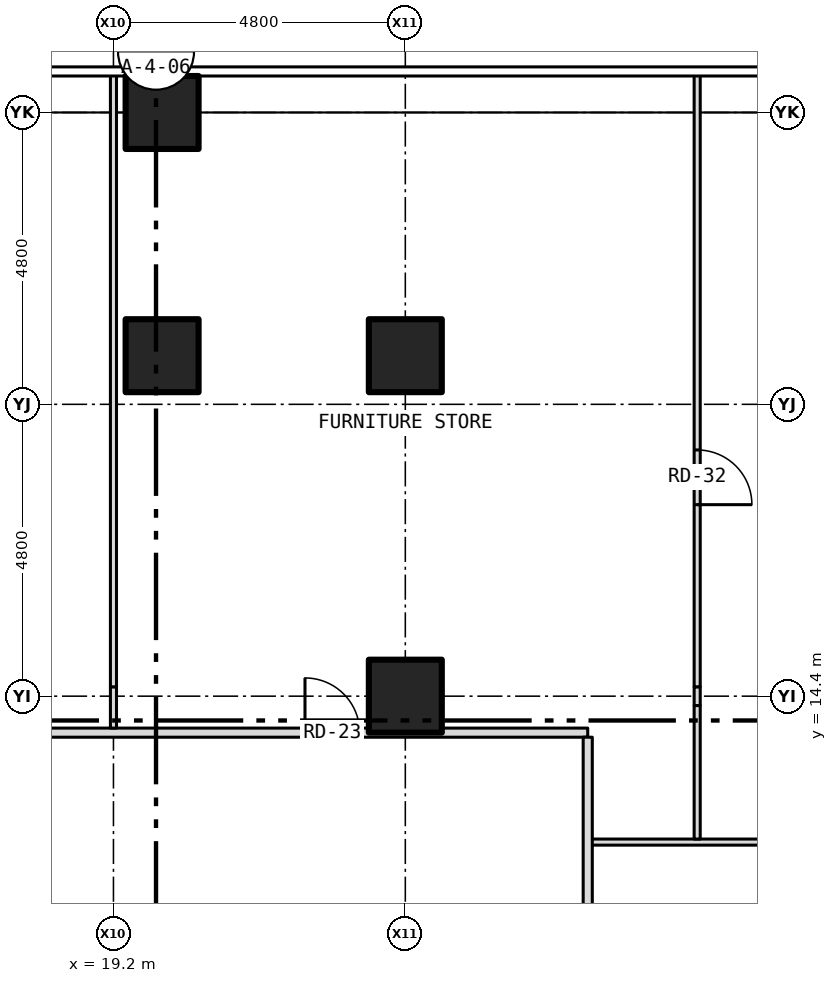
"""IFC4 building model, lengths in metres.
Left out: names, types, materials, properties, quantities, classifications, styles, units other than length and angle.
Written with IfcOpenShell. Run it as: python <this file> out.ifc"""

import sys

from ifc_helpers import new_model, si_unit, direction, frame, frame_2d, origin, origin_2d, place, context, subcontext, project, spatial, rectangle, hollow_rectangle, extrude, element, fill, save


model = new_model("IFC4")
c1 = context("Model", 3, precision=1e-05, world=origin(), true_north=direction((0.0, 1.0)))
c2 = subcontext(c1, "Body", "Model", "MODEL_VIEW")
j1 = project(units=[si_unit("LENGTHUNIT", "METRE"), si_unit("PLANEANGLEUNIT", "RADIAN")], contexts=[c1])
p1 = place(None, origin())
s1 = spatial("IfcSite", under=j1, at=p1, CompositionType="ELEMENT")
p2 = place(p1, origin())
s2 = spatial("IfcBuilding", under=s1, at=p2, CompositionType="ELEMENT")
p3 = place(p2, frame((0.0, 0.0, 15.5)))
s3 = spatial("IfcBuildingStorey", under=s2, at=p3, CompositionType="ELEMENT", Elevation=15.5)
for number, where, z_axis, x_axis in (
    (1, (20.0, 24.0, -0.2), (0.0, 0.0, 1.0), (1.0, 0.0, 0.0)),
    (2, (20.0, 20.0, -0.2), (0.0, 0.0, 1.0), (1.0, 0.0, 0.0)),
    (3, (24.0, 14.4, -0.2), (0.0, 0.0, 1.0), (1.0, 0.0, 0.0)),
    (4, (24.0, 20.0, -0.2), (0.0, 0.0, 1.0), (1.0, 0.0, 0.0)),
):
    element("IfcColumn", number, at=place(p3, frame(where, z_axis=z_axis, x_axis=x_axis)), inside=s3, PredefinedType="COLUMN", context=c2, shape_type="SweptSolid", body=[
        extrude(hollow_rectangle(XDim=1.2, YDim=1.2, WallThickness=0.07, at=origin_2d()), origin(), (0.0, 0.0, 1.0), 4.5),
    ])
p4 = place(p3, frame((27.0, 12.0, 0.0), z_axis=(0.0, 0.0, 1.0), x_axis=(1.0, 0.0, 0.0)))
e5 = element("IfcWall", 5, at=p4, inside=s3, PredefinedType="PARTITIONING", context=c2, shape_type="SweptSolid", body=[
    extrude(rectangle(XDim=11.28, YDim=0.1, at=frame_2d((5.64, 0.0))), origin(), (0.0, 0.0, 1.0), 4.3),
])
p5 = place(p3, frame((-27.0, 13.8, 0.0), z_axis=(0.0, 0.0, 1.0), x_axis=(1.0, 0.0, 0.0)))
e6 = element("IfcWall", 6, at=p5, inside=s3, PredefinedType="PARTITIONING", context=c2, shape_type="SweptSolid", body=[
    extrude(rectangle(XDim=54.0, YDim=0.15, at=frame_2d((27.0, 0.0))), origin(), (0.0, 0.0, 1.0), 4.3),
])
p6 = place(p5, frame((29.001, 0.0, 0.0)))
e7 = element("IfcOpeningElement", 7, at=p6, cuts=e6, PredefinedType="OPENING", context=c2, shape_type="SweptSolid", body=[
    extrude(rectangle(XDim=0.9, YDim=2.1, at=frame_2d((0.45, 1.05))), frame((0.0, 0.087, 0.0), z_axis=(0.0, -1.0, 0.0), x_axis=(1.0, 0.0, 0.0)), (0.0, 0.0, 1.0), 0.174),
])
p7 = place(p5, frame((33.801, 0.0, 0.0)))
e8 = element("IfcOpeningElement", 8, at=p7, cuts=e6, PredefinedType="OPENING", context=c2, shape_type="SweptSolid", body=[
    extrude(rectangle(XDim=0.9, YDim=2.1, at=frame_2d((0.45, 1.05))), frame((0.0, 0.087, 0.0), z_axis=(0.0, -1.0, 0.0), x_axis=(1.0, 0.0, 0.0)), (0.0, 0.0, 1.0), 0.174),
])
p8 = place(p5, frame((38.601, 0.0, 0.0)))
e9 = element("IfcOpeningElement", 9, at=p8, cuts=e6, PredefinedType="OPENING", context=c2, shape_type="SweptSolid", body=[
    extrude(rectangle(XDim=0.9, YDim=2.1, at=frame_2d((0.45, 1.05))), frame((0.0, 0.087, 0.0), z_axis=(0.0, -1.0, 0.0), x_axis=(1.0, 0.0, 0.0)), (0.0, 0.0, 1.0), 0.174),
])
p9 = place(p5, frame((43.401, 0.0, 0.0)))
e10 = element("IfcOpeningElement", 10, at=p9, cuts=e6, PredefinedType="OPENING", context=c2, shape_type="SweptSolid", body=[
    extrude(rectangle(XDim=0.9, YDim=2.1, at=frame_2d((0.45, 1.05))), frame((0.0, 0.087, 0.0), z_axis=(0.0, -1.0, 0.0), x_axis=(1.0, 0.0, 0.0)), (0.0, 0.0, 1.0), 0.174),
])
p10 = place(p5, frame((9.801, 0.0, 0.0)))
e11 = element("IfcOpeningElement", 11, at=p10, cuts=e6, PredefinedType="OPENING", context=c2, shape_type="SweptSolid", body=[
    extrude(rectangle(XDim=0.9, YDim=2.1, at=frame_2d((0.45, 1.05))), frame((0.0, 0.087, 0.0), z_axis=(0.0, -1.0, 0.0), x_axis=(1.0, 0.0, 0.0)), (0.0, 0.0, 1.0), 0.174),
])
p11 = place(p5, frame((14.601, 0.0, 0.0)))
e12 = element("IfcOpeningElement", 12, at=p11, cuts=e6, PredefinedType="OPENING", context=c2, shape_type="SweptSolid", body=[
    extrude(rectangle(XDim=0.9, YDim=2.1, at=frame_2d((0.45, 1.05))), frame((0.0, 0.087, 0.0), z_axis=(0.0, -1.0, 0.0), x_axis=(1.0, 0.0, 0.0)), (0.0, 0.0, 1.0), 0.174),
])
p12 = place(p5, frame((20.095, 0.0, 0.0)))
e13 = element("IfcOpeningElement", 13, at=p12, cuts=e6, PredefinedType="OPENING", context=c2, shape_type="SweptSolid", body=[
    extrude(rectangle(XDim=0.9, YDim=2.1, at=frame_2d((0.45, 1.05))), frame((0.0, 0.087, 0.0), z_axis=(0.0, -1.0, 0.0), x_axis=(1.0, 0.0, 0.0)), (0.0, 0.0, 1.0), 0.174),
])
p13 = place(p5, frame((3.75, 0.0, 0.0)))
e14 = element("IfcOpeningElement", 14, at=p13, cuts=e6, PredefinedType="OPENING", context=c2, shape_type="SweptSolid", body=[
    extrude(rectangle(XDim=0.9, YDim=2.1, at=frame_2d((0.45, 1.05))), frame((0.0, 0.087, 0.0), z_axis=(0.0, -1.0, 0.0), x_axis=(1.0, 0.0, 0.0)), (0.0, 0.0, 1.0), 0.174),
])
p14 = place(p5, frame((49.35, 0.0, 0.0)))
e15 = element("IfcOpeningElement", 15, at=p14, cuts=e6, PredefinedType="OPENING", context=c2, shape_type="SweptSolid", body=[
    extrude(rectangle(XDim=0.9, YDim=2.1, at=frame_2d((0.45, 1.05))), frame((0.0, 0.087, 0.0), z_axis=(0.0, -1.0, 0.0), x_axis=(1.0, 0.0, 0.0)), (0.0, 0.0, 1.0), 0.174),
])
p15 = place(p5, frame((24.303, 0.0, 0.0)))
e16 = element("IfcOpeningElement", 16, at=p15, cuts=e6, PredefinedType="OPENING", context=c2, shape_type="SweptSolid", body=[
    extrude(rectangle(XDim=0.9, YDim=2.1, at=frame_2d((0.45, 1.05))), frame((0.0, 0.087, 0.0), z_axis=(0.0, -1.0, 0.0), x_axis=(1.0, 0.0, 0.0)), (0.0, 0.0, 1.0), 0.174),
])
p16 = place(p3, frame((19.2, 13.875, 0.0), z_axis=(0.0, 0.0, 1.0), x_axis=(0.0, 1.0, 0.0)))
e17 = element("IfcWall", 17, at=p16, inside=s3, PredefinedType="PARTITIONING", context=c2, shape_type="SweptSolid", body=[
    extrude(rectangle(XDim=0.679, YDim=0.1, at=frame_2d((0.339, 0.0))), origin(), (0.0, 0.0, 1.0), 4.3),
])
p17 = place(p3, frame((19.2, 14.554, 0.0), z_axis=(0.0, 0.0, 1.0), x_axis=(0.0, 1.0, 0.0)))
e18 = element("IfcWall", 18, at=p17, inside=s3, PredefinedType="PARTITIONING", context=c2, shape_type="SweptSolid", body=[
    extrude(rectangle(XDim=10.076, YDim=0.1, at=frame_2d((5.038, 0.0))), origin(), (0.0, 0.0, 1.0), 3.683),
])
p18 = place(p3, frame((27.0, -13.725, 0.0), z_axis=(0.0, 0.0, 1.0), x_axis=(0.0, 1.0, 0.0)))
e19 = element("IfcWall", 19, at=p18, inside=s3, PredefinedType="PARTITIONING", context=c2, shape_type="SweptSolid", body=[
    extrude(rectangle(XDim=27.45, YDim=0.15, at=frame_2d((13.725, 0.0))), origin(), (0.0, 0.0, 1.0), 4.3),
])
p19 = place(p18, frame((7.275, 0.0, 0.0)))
e20 = element("IfcOpeningElement", 20, at=p19, cuts=e19, PredefinedType="OPENING", context=c2, shape_type="SweptSolid", body=[
    extrude(rectangle(XDim=0.9, YDim=2.1, at=frame_2d((0.45, 1.05))), frame((0.0, 0.087, 0.0), z_axis=(0.0, -1.0, 0.0), x_axis=(1.0, 0.0, 0.0)), (0.0, 0.0, 1.0), 0.174),
])
p20 = place(p18, frame((19.275, 0.0, 0.0)))
e21 = element("IfcOpeningElement", 21, at=p20, cuts=e19, PredefinedType="OPENING", context=c2, shape_type="SweptSolid", body=[
    extrude(rectangle(XDim=0.9, YDim=2.1, at=frame_2d((0.45, 1.05))), frame((0.0, 0.087, 0.0), z_axis=(0.0, -1.0, 0.0), x_axis=(1.0, 0.0, 0.0)), (0.0, 0.0, 1.0), 0.174),
])
p21 = place(p3, frame((28.8, 12.05, 0.0), z_axis=(0.0, 0.0, 1.0), x_axis=(0.0, 1.0, 0.0)))
e22 = element("IfcWall", 22, at=p21, inside=s3, PredefinedType="PARTITIONING", context=c2, shape_type="SweptSolid", body=[
    extrude(rectangle(XDim=2.196, YDim=0.1, at=frame_2d((1.098, 0.0))), origin(), (0.0, 0.0, 1.0), 3.683),
])
p22 = place(p3, frame((28.8, 14.246, 0.0), z_axis=(0.0, 0.0, 1.0), x_axis=(0.0, 1.0, 0.0)))
e23 = element("IfcWall", 23, at=p22, inside=s3, PredefinedType="PARTITIONING", context=c2, shape_type="SweptSolid", body=[
    extrude(rectangle(XDim=0.308, YDim=0.1, at=frame_2d((0.154, 0.0))), origin(), (0.0, 0.0, 1.0), 4.3),
])
p23 = place(p3, frame((28.8, 14.554, 0.0), z_axis=(0.0, 0.0, 1.0), x_axis=(0.0, 1.0, 0.0)))
e24 = element("IfcWall", 24, at=p23, inside=s3, PredefinedType="PARTITIONING", context=c2, shape_type="SweptSolid", body=[
    extrude(rectangle(XDim=10.076, YDim=0.1, at=frame_2d((5.038, 0.0))), origin(), (0.0, 0.0, 1.0), 3.683),
])
p24 = place(p23, frame((2.996, 0.0, 0.0)))
e25 = element("IfcOpeningElement", 25, at=p24, cuts=e24, PredefinedType="OPENING", context=c2, shape_type="SweptSolid", body=[
    extrude(rectangle(XDim=0.9, YDim=2.1, at=frame_2d((0.45, 1.05))), frame((0.0, 0.062, 0.0), z_axis=(0.0, -1.0, 0.0), x_axis=(1.0, 0.0, 0.0)), (0.0, 0.0, 1.0), 0.124),
])
p25 = place(p14, origin())
e26 = element("IfcDoor", 26, at=p25, inside=s3, OperationType="SINGLE_SWING_LEFT", PredefinedType="DOOR", context=c2, shape_type="SweptSolid", body=[
    extrude(rectangle(XDim=0.9, YDim=2.1, at=frame_2d((0.45, 1.05))), frame((0.0, 0.025, 0.0), z_axis=(0.0, -1.0, 0.0), x_axis=(1.0, 0.0, 0.0)), (0.0, 0.0, 1.0), 0.05),
])
fill(e15, e26)
p26 = place(p24, origin())
e27 = element("IfcDoor", 27, at=p26, inside=s3, OperationType="SINGLE_SWING_LEFT", PredefinedType="DOOR", context=c2, shape_type="SweptSolid", body=[
    extrude(rectangle(XDim=0.9, YDim=2.1, at=frame_2d((0.45, 1.05))), frame((0.0, 0.025, 0.0), z_axis=(0.0, -1.0, 0.0), x_axis=(1.0, 0.0, 0.0)), (0.0, 0.0, 1.0), 0.05),
])
fill(e25, e27)
save(model, sys.argv[1])
